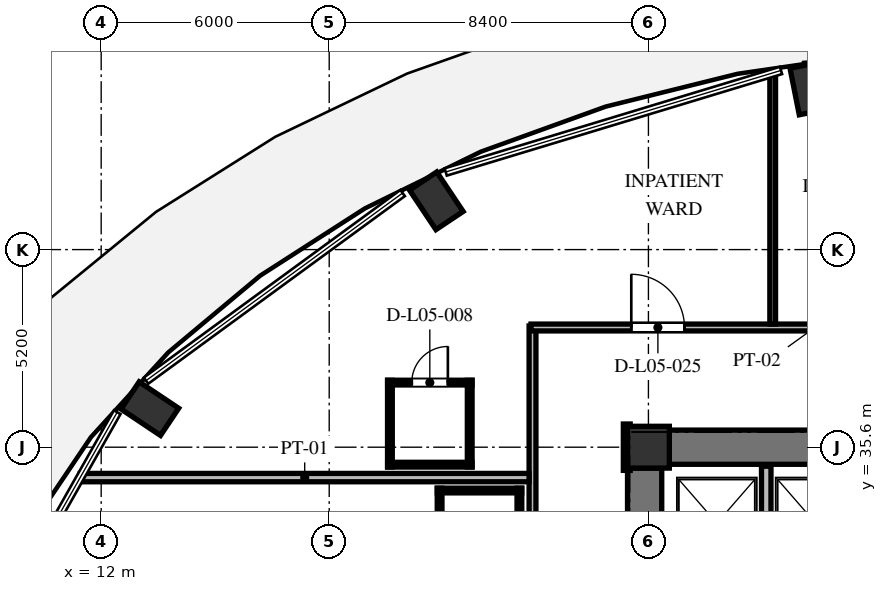
"""IFC4 building model, lengths in metres.
Left out: names, types, materials, properties, quantities, classifications, styles, units other than length and angle.
Written with IfcOpenShell. Run it as: python <this file> out.ifc"""

import sys

from ifc_helpers import new_model, si_unit, direction, frame, frame_2d, origin, origin_2d, place, context, subcontext, project, spatial, rectangle, extrude, element, fill, save


model = new_model("IFC4")
c1 = context("Model", 3, precision=1e-05, world=origin(), true_north=direction((0.0, 1.0)))
c2 = subcontext(c1, "Body", "Model", "MODEL_VIEW")
j1 = project(units=[si_unit("LENGTHUNIT", "METRE"), si_unit("PLANEANGLEUNIT", "RADIAN")], contexts=[c1])
p1 = place(None, origin())
s1 = spatial("IfcSite", under=j1, at=p1, CompositionType="ELEMENT")
p2 = place(p1, origin())
s2 = spatial("IfcBuilding", under=s1, at=p2, CompositionType="ELEMENT")
p3 = place(p2, frame((0.0, 0.0, 25.2)))
s3 = spatial("IfcBuildingStorey", under=s2, at=p3, CompositionType="ELEMENT", Elevation=25.2)
for number, where, z_axis, x_axis in (
    (1, (30.669, 45.044, 0.0), (0.0, 0.0, 1.0), (-0.195, 0.981, 0.0)),
    (2, (20.819, 42.084, 0.0), (0.0, 0.0, 1.0), (-0.556, 0.831, 0.0)),
    (3, (13.28, 36.614, 0.0), (0.0, 0.0, 1.0), (-0.831, 0.556, 0.0)),
):
    element("IfcColumn", number, at=place(p3, frame(where, z_axis=z_axis, x_axis=x_axis)), inside=s3, PredefinedType="COLUMN", context=c2, shape_type="SweptSolid", body=[
        extrude(rectangle(XDim=1.25, YDim=0.86, at=origin_2d()), origin(), (0.0, 0.0, 1.0), 3.648),
    ])
p4 = place(p3, frame((26.4, 35.6, 0.0), z_axis=(0.0, 0.0, 1.0), x_axis=(1.0, 0.0, 0.0)))
e4 = element("IfcColumn", 4, at=p4, inside=s3, PredefinedType="COLUMN", context=c2, shape_type="SweptSolid", body=[
    extrude(rectangle(XDim=1.1, YDim=1.1, at=origin_2d()), origin(), (0.0, 0.0, 1.0), 3.648),
])
p5 = place(p3, frame((26.3, 20.95, 0.0), z_axis=(0.0, 0.0, 1.0), x_axis=(0.0, 1.0, 0.0)))
e5 = element("IfcWall", 5, at=p5, inside=s3, PredefinedType="SHEAR", context=c2, shape_type="SweptSolid", body=[
    extrude(rectangle(XDim=14.1, YDim=0.9, at=frame_2d((7.05, 0.0))), origin(), (0.0, 0.0, 1.0), 3.648),
])
p6 = place(p5, frame((6.5, 0.0, 0.0)))
e6 = element("IfcOpeningElement", 6, at=p6, cuts=e5, PredefinedType="OPENING", context=c2, shape_type="SweptSolid", body=[
    extrude(rectangle(XDim=1.2, YDim=2.15, at=frame_2d((0.6, 1.075))), frame((0.0, 0.46, 0.0), z_axis=(0.0, -1.0, 0.0), x_axis=(1.0, 0.0, 0.0)), (0.0, 0.0, 1.0), 0.92),
])
p7 = place(p5, frame((9.6, 0.0, 0.0)))
e7 = element("IfcOpeningElement", 7, at=p7, cuts=e5, PredefinedType="OPENING", context=c2, shape_type="SweptSolid", body=[
    extrude(rectangle(XDim=1.3, YDim=2.2, at=frame_2d((0.65, 1.1))), frame((0.0, 0.46, 0.0), z_axis=(0.0, -1.0, 0.0), x_axis=(1.0, 0.0, 0.0)), (0.0, 0.0, 1.0), 0.92),
])
p8 = place(p5, frame((3.26, 0.0, 0.0)))
e8 = element("IfcOpeningElement", 8, at=p8, cuts=e5, PredefinedType="OPENING", context=c2, shape_type="SweptSolid", body=[
    extrude(rectangle(XDim=1.3, YDim=2.2, at=frame_2d((0.65, 1.1))), frame((0.0, 0.46, 0.0), z_axis=(0.0, -1.0, 0.0), x_axis=(1.0, 0.0, 0.0)), (0.0, 0.0, 1.0), 0.92),
])
p9 = place(p3, frame((26.95, 35.6, 0.0), z_axis=(0.0, 0.0, 1.0), x_axis=(1.0, 0.0, 0.0)))
e9 = element("IfcWall", 9, at=p9, inside=s3, PredefinedType="SHEAR", context=c2, shape_type="SweptSolid", body=[
    extrude(rectangle(XDim=5.3, YDim=0.9, at=frame_2d((2.65, 0.0))), origin(), (0.0, 0.0, 1.0), 3.648),
])
p10 = place(p3, frame((36.179, 45.953, 0.0), z_axis=(0.0, 0.0, 1.0), x_axis=(-0.997421878774, -0.071760683825, 0.0)))
e10 = element("IfcWall", 10, at=p10, inside=s3, PredefinedType="SOLIDWALL", context=c2, shape_type="SweptSolid", body=[
    extrude(rectangle(XDim=5.675, YDim=0.32, at=frame_2d((2.837, 0.0))), origin(), (0.0, 0.0, 1.0), 3.428),
])
p11 = place(p10, frame((2.696, 0.0, 0.85)))
e11 = element("IfcOpeningElement", 11, at=p11, cuts=e10, PredefinedType="OPENING", context=c2, shape_type="SweptSolid", body=[
    extrude(rectangle(XDim=1.2, YDim=1.8, at=frame_2d((0.6, 0.9))), frame((0.0, 0.17, 0.0), z_axis=(0.0, -1.0, 0.0), x_axis=(1.0, 0.0, 0.0)), (0.0, 0.0, 1.0), 0.34),
])
p12 = place(p3, frame((29.5, 32.42, 0.0), z_axis=(0.0, 0.0, 1.0), x_axis=(0.0, 1.0, 0.0)))
e12 = element("IfcWall", 12, at=p12, inside=s3, PredefinedType="SOLIDWALL", context=c2, shape_type="SweptSolid", body=[
    extrude(rectangle(XDim=2.68, YDim=0.25, at=frame_2d((1.34, 0.0))), origin(), (0.0, 0.0, 1.0), 3.428),
])
p13 = place(p3, frame((23.35, 29.36, 0.0), z_axis=(0.0, 0.0, 1.0), x_axis=(0.0, 1.0, 0.0)))
e13 = element("IfcWall", 13, at=p13, inside=s3, PredefinedType="PARTITIONING", context=c2, shape_type="SweptSolid", body=[
    extrude(rectangle(XDim=9.43, YDim=0.18, at=frame_2d((4.715, 0.0))), origin(), (0.0, 0.0, 1.0), 3.428),
])
p14 = place(p3, frame((23.31, 38.75, 0.0), z_axis=(0.0, 0.0, 1.0), x_axis=(1.0, 0.0, 0.0)))
e14 = element("IfcWall", 14, at=p14, inside=s3, PredefinedType="PARTITIONING", context=c2, shape_type="SweptSolid", body=[
    extrude(rectangle(XDim=29.88, YDim=0.18, at=frame_2d((14.94, 0.0))), origin(), (0.0, 0.0, 1.0), 3.053),
])
p15 = place(p14, frame((25.591, 0.0, 0.0)))
e15 = element("IfcOpeningElement", 15, at=p15, cuts=e14, PredefinedType="OPENING", context=c2, shape_type="SweptSolid", body=[
    extrude(rectangle(XDim=1.4, YDim=2.2, at=frame_2d((0.7, 1.1))), frame((0.0, 0.1, 0.0), z_axis=(0.0, -1.0, 0.0), x_axis=(1.0, 0.0, 0.0)), (0.0, 0.0, 1.0), 0.2),
])
p16 = place(p14, frame((20.24, 0.0, 0.0)))
e16 = element("IfcOpeningElement", 16, at=p16, cuts=e14, PredefinedType="OPENING", context=c2, shape_type="SweptSolid", body=[
    extrude(rectangle(XDim=1.4, YDim=2.2, at=frame_2d((0.7, 1.1))), frame((0.0, 0.1, 0.0), z_axis=(0.0, -1.0, 0.0), x_axis=(1.0, 0.0, 0.0)), (0.0, 0.0, 1.0), 0.2),
])
p17 = place(p14, frame((16.075, 0.0, 0.0)))
e17 = element("IfcOpeningElement", 17, at=p17, cuts=e14, PredefinedType="OPENING", context=c2, shape_type="SweptSolid", body=[
    extrude(rectangle(XDim=1.4, YDim=2.2, at=frame_2d((0.7, 1.1))), frame((0.0, 0.1, 0.0), z_axis=(0.0, -1.0, 0.0), x_axis=(1.0, 0.0, 0.0)), (0.0, 0.0, 1.0), 0.2),
])
p18 = place(p14, frame((11.905, 0.0, 0.0)))
e18 = element("IfcOpeningElement", 18, at=p18, cuts=e14, PredefinedType="OPENING", context=c2, shape_type="SweptSolid", body=[
    extrude(rectangle(XDim=1.4, YDim=2.2, at=frame_2d((0.7, 1.1))), frame((0.0, 0.1, 0.0), z_axis=(0.0, -1.0, 0.0), x_axis=(1.0, 0.0, 0.0)), (0.0, 0.0, 1.0), 0.2),
])
p19 = place(p14, frame((7.74, 0.0, 0.0)))
e19 = element("IfcOpeningElement", 19, at=p19, cuts=e14, PredefinedType="OPENING", context=c2, shape_type="SweptSolid", body=[
    extrude(rectangle(XDim=1.4, YDim=2.2, at=frame_2d((0.7, 1.1))), frame((0.0, 0.1, 0.0), z_axis=(0.0, -1.0, 0.0), x_axis=(1.0, 0.0, 0.0)), (0.0, 0.0, 1.0), 0.2),
])
p20 = place(p14, frame((2.639, 0.0, 0.0)))
e20 = element("IfcOpeningElement", 20, at=p20, cuts=e14, PredefinedType="OPENING", context=c2, shape_type="SweptSolid", body=[
    extrude(rectangle(XDim=1.4, YDim=2.2, at=frame_2d((0.7, 1.1))), frame((0.0, 0.1, 0.0), z_axis=(0.0, -1.0, 0.0), x_axis=(1.0, 0.0, 0.0)), (0.0, 0.0, 1.0), 0.2),
])
p21 = place(p3, frame((25.83, 36.21, 0.0), z_axis=(0.0, 0.0, 1.0), x_axis=(0.0, -1.0, 0.0)))
e21 = element("IfcWall", 21, at=p21, inside=s3, PredefinedType="PARTITIONING", context=c2, shape_type="SweptSolid", body=[
    extrude(rectangle(XDim=1.22, YDim=0.18, at=frame_2d((0.61, 0.0))), origin(), (0.0, 0.0, 1.0), 3.428),
])
p22 = place(p3, frame((11.451, 34.8, 0.0), z_axis=(0.0, 0.0, 1.0), x_axis=(1.0, 0.0, 0.0)))
e22 = element("IfcWall", 22, at=p22, inside=s3, PredefinedType="PARTITIONING", context=c2, shape_type="SweptSolid", body=[
    extrude(rectangle(XDim=11.809, YDim=0.22, at=frame_2d((5.905, 0.0))), origin(), (0.0, 0.0, 1.0), 3.428),
])
p23 = place(p3, frame((29.67, 38.84, 0.0), z_axis=(0.0, 0.0, 1.0), x_axis=(0.0, 1.0, 0.0)))
e23 = element("IfcWall", 23, at=p23, inside=s3, PredefinedType="PARTITIONING", context=c2, shape_type="SweptSolid", body=[
    extrude(rectangle(XDim=6.596, YDim=0.15, at=frame_2d((3.298, 0.0))), origin(), (0.0, 0.0, 1.0), 3.428),
])
p24 = place(p3, frame((19.538, 37.3, 0.0), z_axis=(0.0, 0.0, 1.0), x_axis=(1.0, 0.0, 0.0)))
e24 = element("IfcWall", 24, at=p24, inside=s3, PredefinedType="PARTITIONING", context=c2, shape_type="SweptSolid", body=[
    extrude(rectangle(XDim=2.22, YDim=0.125, at=frame_2d((1.11, 0.0))), origin(), (0.0, 0.0, 1.0), 3.428),
])
p25 = place(p24, frame((0.635, 0.0, 0.0)))
e25 = element("IfcOpeningElement", 25, at=p25, cuts=e24, PredefinedType="OPENING", context=c2, shape_type="SweptSolid", body=[
    extrude(rectangle(XDim=0.95, YDim=2.1, at=frame_2d((0.475, 1.05))), frame((0.0, 0.073, 0.0), z_axis=(0.0, -1.0, 0.0), x_axis=(1.0, 0.0, 0.0)), (0.0, 0.0, 1.0), 0.145),
])
p26 = place(p3, frame((19.538, 35.14, 0.0), z_axis=(0.0, 0.0, 1.0), x_axis=(1.0, 0.0, 0.0)))
e26 = element("IfcWall", 26, at=p26, inside=s3, PredefinedType="PARTITIONING", context=c2, shape_type="SweptSolid", body=[
    extrude(rectangle(XDim=2.22, YDim=0.125, at=frame_2d((1.11, 0.0))), origin(), (0.0, 0.0, 1.0), 3.428),
])
for number, where, z_axis, x_axis in (
    (27, (21.698, 35.08, 0.0), (0.0, 0.0, 1.0), (0.0, 1.0, 0.0)),
    (28, (19.597, 35.08, 0.0), (0.0, 0.0, 1.0), (0.0, 1.0, 0.0)),
):
    element("IfcWall", number, at=place(p3, frame(where, z_axis=z_axis, x_axis=x_axis)), inside=s3, PredefinedType="PARTITIONING", context=c2, shape_type="SweptSolid", body=[
        extrude(rectangle(XDim=2.28, YDim=0.125, at=frame_2d((1.14, 0.0))), origin(), (0.0, 0.0, 1.0), 3.428),
    ])
p27 = place(p3, frame((20.845, 34.46, 0.0), z_axis=(0.0, 0.0, 1.0), x_axis=(1.0, 0.0, 0.0)))
e29 = element("IfcWall", 29, at=p27, inside=s3, PredefinedType="PARTITIONING", context=c2, shape_type="SweptSolid", body=[
    extrude(rectangle(XDim=2.22, YDim=0.125, at=frame_2d((1.11, 0.0))), origin(), (0.0, 0.0, 1.0), 3.428),
])
for number, where, z_axis, x_axis in (
    (30, (23.005, 32.24, 0.0), (0.0, 0.0, 1.0), (0.0, 1.0, 0.0)),
    (31, (20.905, 32.24, 0.0), (0.0, 0.0, 1.0), (0.0, 1.0, 0.0)),
):
    element("IfcWall", number, at=place(p3, frame(where, z_axis=z_axis, x_axis=x_axis)), inside=s3, PredefinedType="PARTITIONING", context=c2, shape_type="SweptSolid", body=[
        extrude(rectangle(XDim=2.28, YDim=0.125, at=frame_2d((1.14, 0.0))), origin(), (0.0, 0.0, 1.0), 3.428),
    ])
p28 = place(p25, origin())
e32 = element("IfcDoor", 32, at=p28, inside=s3, OperationType="SINGLE_SWING_RIGHT", PredefinedType="DOOR", context=c2, shape_type="SweptSolid", body=[
    extrude(rectangle(XDim=0.95, YDim=2.1, at=frame_2d((0.475, 1.05))), frame((0.0, 0.025, 0.0), z_axis=(0.0, -1.0, 0.0), x_axis=(1.0, 0.0, 0.0)), (0.0, 0.0, 1.0), 0.05),
])
fill(e25, e32)
p29 = place(p20, origin())
e33 = element("IfcDoor", 33, at=p29, inside=s3, OperationType="SINGLE_SWING_LEFT", PredefinedType="DOOR", context=c2, shape_type="SweptSolid", body=[
    extrude(rectangle(XDim=1.4, YDim=2.2, at=frame_2d((0.7, 1.1))), frame((0.0, 0.025, 0.0), z_axis=(0.0, -1.0, 0.0), x_axis=(1.0, 0.0, 0.0)), (0.0, 0.0, 1.0), 0.05),
])
fill(e20, e33)
save(model, sys.argv[1])
